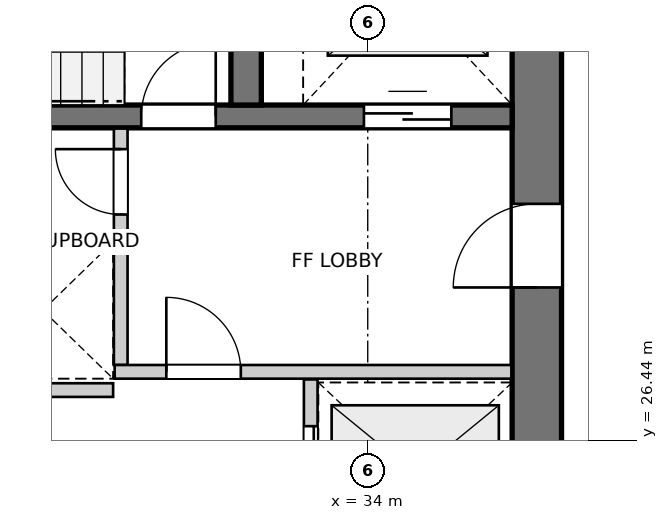
"""IFC4 building model, lengths in metres.
Left out: names, types, materials, properties, quantities, classifications, styles, units other than length and angle.
Written with IfcOpenShell. Run it as: python <this file> out.ifc"""

import sys

from ifc_helpers import new_model, si_unit, direction, frame, frame_2d, origin, place, context, subcontext, project, spatial, rectangle, extrude, source, transform, mapped, element, fill, save


model = new_model("IFC4")
c1 = context("Model", 3, precision=1e-05, world=origin(), true_north=direction((0.0, 1.0)))
c2 = subcontext(c1, "Body", "Model", "MODEL_VIEW")
j1 = project(units=[si_unit("LENGTHUNIT", "METRE"), si_unit("PLANEANGLEUNIT", "RADIAN")], contexts=[c1])
p1 = place(None, origin())
s1 = spatial("IfcSite", under=j1, at=p1, CompositionType="ELEMENT")
p2 = place(p1, origin())
s2 = spatial("IfcBuilding", under=s1, at=p2, CompositionType="ELEMENT")
p3 = place(p2, frame((0.0, 0.0, 83.2)))
s3 = spatial("IfcBuildingStorey", under=s2, at=p3, CompositionType="ELEMENT", Elevation=83.2)
p4 = place(p3, frame((36.225, 18.2, 0.0), z_axis=(0.0, 0.0, 1.0), x_axis=(0.0, 1.0, 0.0)))
e1 = element("IfcWall", 1, at=p4, inside=s3, PredefinedType="SHEAR", context=c2, shape_type="SweptSolid", body=[
    extrude(rectangle(XDim=15.6, YDim=0.65, at=frame_2d((7.8, 0.0))), origin(), (0.0, 0.0, 1.0), 2.935),
])
p5 = place(p4, frame((4.25, 0.0, 0.0)))
e2 = element("IfcOpeningElement", 2, at=p5, cuts=e1, PredefinedType="OPENING", context=c2, shape_type="SweptSolid", body=[
    extrude(rectangle(XDim=1.1, YDim=2.15, at=frame_2d((0.55, 1.075))), frame((0.0, 0.335, 0.0), z_axis=(0.0, -1.0, 0.0), x_axis=(1.0, 0.0, 0.0)), (0.0, 0.0, 1.0), 0.67),
])
p6 = place(p4, frame((10.25, 0.0, 0.0)))
e3 = element("IfcOpeningElement", 3, at=p6, cuts=e1, PredefinedType="OPENING", context=c2, shape_type="SweptSolid", body=[
    extrude(rectangle(XDim=1.1, YDim=2.15, at=frame_2d((0.55, 1.075))), frame((0.0, 0.335, 0.0), z_axis=(0.0, -1.0, 0.0), x_axis=(1.0, 0.0, 0.0)), (0.0, 0.0, 1.0), 0.67),
])
p7 = place(p3, frame((24.8, 30.7, 0.0), z_axis=(0.0, 0.0, 1.0), x_axis=(1.0, 0.0, 0.0)))
e4 = element("IfcWall", 4, at=p7, inside=s3, PredefinedType="SHEAR", context=c2, shape_type="SweptSolid", body=[
    extrude(rectangle(XDim=11.1, YDim=0.3, at=frame_2d((5.55, 0.0))), origin(), (0.0, 0.0, 1.0), 2.935),
])
p8 = place(p7, frame((6.22, 0.0, 0.0)))
e5 = element("IfcOpeningElement", 5, at=p8, cuts=e4, PredefinedType="OPENING", context=c2, shape_type="SweptSolid", body=[
    extrude(rectangle(XDim=0.98, YDim=2.15, at=frame_2d((0.49, 1.075))), frame((0.0, 0.16, 0.0), z_axis=(0.0, -1.0, 0.0), x_axis=(1.0, 0.0, 0.0)), (0.0, 0.0, 1.0), 0.32),
])
p9 = place(p7, frame((9.15, 0.0, 0.0)))
e6 = element("IfcOpeningElement", 6, at=p9, cuts=e4, PredefinedType="OPENING", context=c2, shape_type="SweptSolid", body=[
    extrude(rectangle(XDim=1.15, YDim=2.15, at=frame_2d((0.575, 1.075))), frame((0.0, 0.16, 0.0), z_axis=(0.0, -1.0, 0.0), x_axis=(1.0, 0.0, 0.0)), (0.0, 0.0, 1.0), 0.32),
])
p10 = place(p3, frame((32.4, 30.85, 0.0), z_axis=(0.0, 0.0, 1.0), x_axis=(0.0, 1.0, 0.0)))
e7 = element("IfcWall", 7, at=p10, inside=s3, PredefinedType="SHEAR", context=c2, shape_type="SweptSolid", body=[
    extrude(rectangle(XDim=2.95, YDim=0.4, at=frame_2d((1.475, 0.0))), origin(), (0.0, 0.0, 1.0), 2.935),
])
p11 = place(p3, frame((30.75, 27.43, 0.0), z_axis=(0.0, 0.0, 1.0), x_axis=(0.0, 1.0, 0.0)))
e8 = element("IfcWall", 8, at=p11, inside=s3, PredefinedType="PARTITIONING", context=c2, shape_type="SweptSolid", body=[
    extrude(rectangle(XDim=3.11, YDim=0.18, at=frame_2d((1.555, 0.0))), origin(), (0.0, 0.0, 1.0), 2.935),
])
p12 = place(p11, frame((1.98, 0.0, 0.0)))
e9 = element("IfcOpeningElement", 9, at=p12, cuts=e8, PredefinedType="OPENING", context=c2, shape_type="SweptSolid", body=[
    extrude(rectangle(XDim=0.86, YDim=2.05, at=frame_2d((0.43, 1.025))), frame((0.0, 0.1, 0.0), z_axis=(0.0, -1.0, 0.0), x_axis=(1.0, 0.0, 0.0)), (0.0, 0.0, 1.0), 0.2),
])
p13 = place(p3, frame((30.67, 27.34, 0.0), z_axis=(0.0, 0.0, 1.0), x_axis=(1.0, 0.0, 0.0)))
e10 = element("IfcWall", 10, at=p13, inside=s3, PredefinedType="PARTITIONING", context=c2, shape_type="SweptSolid", body=[
    extrude(rectangle(XDim=5.22, YDim=0.18, at=frame_2d((2.61, 0.0))), origin(), (0.0, 0.0, 1.0), 2.935),
])
p14 = place(p13, frame((0.68, 0.0, 0.0)))
e11 = element("IfcOpeningElement", 11, at=p14, cuts=e10, PredefinedType="OPENING", context=c2, shape_type="SweptSolid", body=[
    extrude(rectangle(XDim=0.98, YDim=2.15, at=frame_2d((0.49, 1.075))), frame((0.0, 0.1, 0.0), z_axis=(0.0, -1.0, 0.0), x_axis=(1.0, 0.0, 0.0)), (0.0, 0.0, 1.0), 0.2),
])
p15 = place(p3, frame((33.25, 24.76, 0.0), z_axis=(0.0, 0.0, 1.0), x_axis=(0.0, 1.0, 0.0)))
e12 = element("IfcWall", 12, at=p15, inside=s3, PredefinedType="PARTITIONING", context=c2, shape_type="SweptSolid", body=[
    extrude(rectangle(XDim=2.48, YDim=0.18, at=frame_2d((1.24, 0.0))), origin(), (0.0, 0.0, 1.0), 2.935),
])
p16 = place(p15, frame((0.615, 0.0, 0.0)))
e13 = element("IfcOpeningElement", 13, at=p16, cuts=e12, PredefinedType="OPENING", context=c2, shape_type="SweptSolid", body=[
    extrude(rectangle(XDim=1.25, YDim=2.15, at=frame_2d((0.625, 1.075))), frame((0.0, 0.1, 0.0), z_axis=(0.0, -1.0, 0.0), x_axis=(1.0, 0.0, 0.0)), (0.0, 0.0, 1.0), 0.2),
])
p17 = place(p3, frame((24.81, 29.08, 0.0), z_axis=(0.0, 0.0, 1.0), x_axis=(1.0, 0.0, 0.0)))
e14 = element("IfcWall", 14, at=p17, inside=s3, PredefinedType="PARTITIONING", context=c2, shape_type="SweptSolid", body=[
    extrude(rectangle(XDim=5.84, YDim=0.18, at=frame_2d((2.92, 0.0))), origin(), (0.0, 0.0, 1.0), 2.935),
])
p18 = place(p3, frame((28.825, 27.1, 0.0), z_axis=(0.0, 0.0, 1.0), x_axis=(1.0, 0.0, 0.0)))
e15 = element("IfcWall", 15, at=p18, inside=s3, PredefinedType="PARTITIONING", context=c2, shape_type="SweptSolid", body=[
    extrude(rectangle(XDim=1.825, YDim=0.18, at=frame_2d((0.913, 0.0))), origin(), (0.0, 0.0, 1.0), 2.935),
])
m1 = source(origin(), c2, "Body", "SweptSolid", [
    extrude(rectangle(XDim=0.98, YDim=2.15, at=frame_2d((0.49, 1.075))), frame((0.0, 0.025, 0.0), z_axis=(0.0, -1.0, 0.0), x_axis=(1.0, 0.0, 0.0)), (0.0, 0.0, 1.0), 0.05),
])
p19 = place(p8, origin())
e16 = element("IfcDoor", 16, at=p19, inside=s3, OperationType="SINGLE_SWING_RIGHT", PredefinedType="DOOR", context=c2, shape_type="MappedRepresentation", body=[
    mapped(m1, transform((0.0, 0.0, 0.0), x_axis=(1.0, 0.0, 0.0), y_axis=(0.0, 1.0, 0.0), z_axis=(0.0, 0.0, 1.0), scale=1.0)),
])
fill(e5, e16)
m2 = source(origin(), c2, "Body", "SweptSolid", [
    extrude(rectangle(XDim=1.15, YDim=2.15, at=frame_2d((0.575, 1.075))), frame((0.0, 0.025, 0.0), z_axis=(0.0, -1.0, 0.0), x_axis=(1.0, 0.0, 0.0)), (0.0, 0.0, 1.0), 0.05),
])
p20 = place(p9, origin())
e17 = element("IfcDoor", 17, at=p20, inside=s3, OperationType="DOUBLE_DOOR_SLIDING", PredefinedType="DOOR", context=c2, shape_type="MappedRepresentation", body=[
    mapped(m2, transform((0.0, 0.0, 0.0), x_axis=(1.0, 0.0, 0.0), y_axis=(0.0, 1.0, 0.0), z_axis=(0.0, 0.0, 1.0), scale=1.0)),
])
fill(e6, e17)
m3 = source(origin(), c2, "Body", "SweptSolid", [
    extrude(rectangle(XDim=1.1, YDim=2.15, at=frame_2d((0.55, 1.075))), frame((0.0, 0.025, 0.0), z_axis=(0.0, -1.0, 0.0), x_axis=(1.0, 0.0, 0.0)), (0.0, 0.0, 1.0), 0.05),
])
p21 = place(p6, origin())
e18 = element("IfcDoor", 18, at=p21, inside=s3, OperationType="SINGLE_SWING_LEFT", PredefinedType="DOOR", context=c2, shape_type="MappedRepresentation", body=[
    mapped(m3, transform((0.0, 0.0, 0.0), x_axis=(1.0, 0.0, 0.0), y_axis=(0.0, 1.0, 0.0), z_axis=(0.0, 0.0, 1.0), scale=1.0)),
])
fill(e3, e18)
m4 = source(origin(), c2, "Body", "SweptSolid", [
    extrude(rectangle(XDim=0.86, YDim=2.05, at=frame_2d((0.43, 1.025))), frame((0.0, 0.025, 0.0), z_axis=(0.0, -1.0, 0.0), x_axis=(1.0, 0.0, 0.0)), (0.0, 0.0, 1.0), 0.05),
])
p22 = place(p12, origin())
e19 = element("IfcDoor", 19, at=p22, inside=s3, OperationType="SINGLE_SWING_RIGHT", PredefinedType="DOOR", context=c2, shape_type="MappedRepresentation", body=[
    mapped(m4, transform((0.0, 0.0, 0.0), x_axis=(1.0, 0.0, 0.0), y_axis=(0.0, 1.0, 0.0), z_axis=(0.0, 0.0, 1.0), scale=1.0)),
])
fill(e9, e19)
p23 = place(p14, origin())
e20 = element("IfcDoor", 20, at=p23, inside=s3, OperationType="SINGLE_SWING_LEFT", PredefinedType="DOOR", context=c2, shape_type="MappedRepresentation", body=[
    mapped(m1, transform((0.0, 0.0, 0.0), x_axis=(1.0, 0.0, 0.0), y_axis=(0.0, 1.0, 0.0), z_axis=(0.0, 0.0, 1.0), scale=1.0)),
])
fill(e11, e20)
m5 = source(origin(), c2, "Body", "SweptSolid", [
    extrude(rectangle(XDim=1.25, YDim=2.15, at=frame_2d((0.625, 1.075))), frame((0.0, 0.025, 0.0), z_axis=(0.0, -1.0, 0.0), x_axis=(1.0, 0.0, 0.0)), (0.0, 0.0, 1.0), 0.05),
])
p24 = place(p16, origin())
e21 = element("IfcDoor", 21, at=p24, inside=s3, OperationType="DOUBLE_DOOR_SLIDING", PredefinedType="DOOR", context=c2, shape_type="MappedRepresentation", body=[
    mapped(m5, transform((0.0, 0.0, 0.0), x_axis=(1.0, 0.0, 0.0), y_axis=(0.0, 1.0, 0.0), z_axis=(0.0, 0.0, 1.0), scale=1.0)),
])
fill(e13, e21)
save(model, sys.argv[1])
